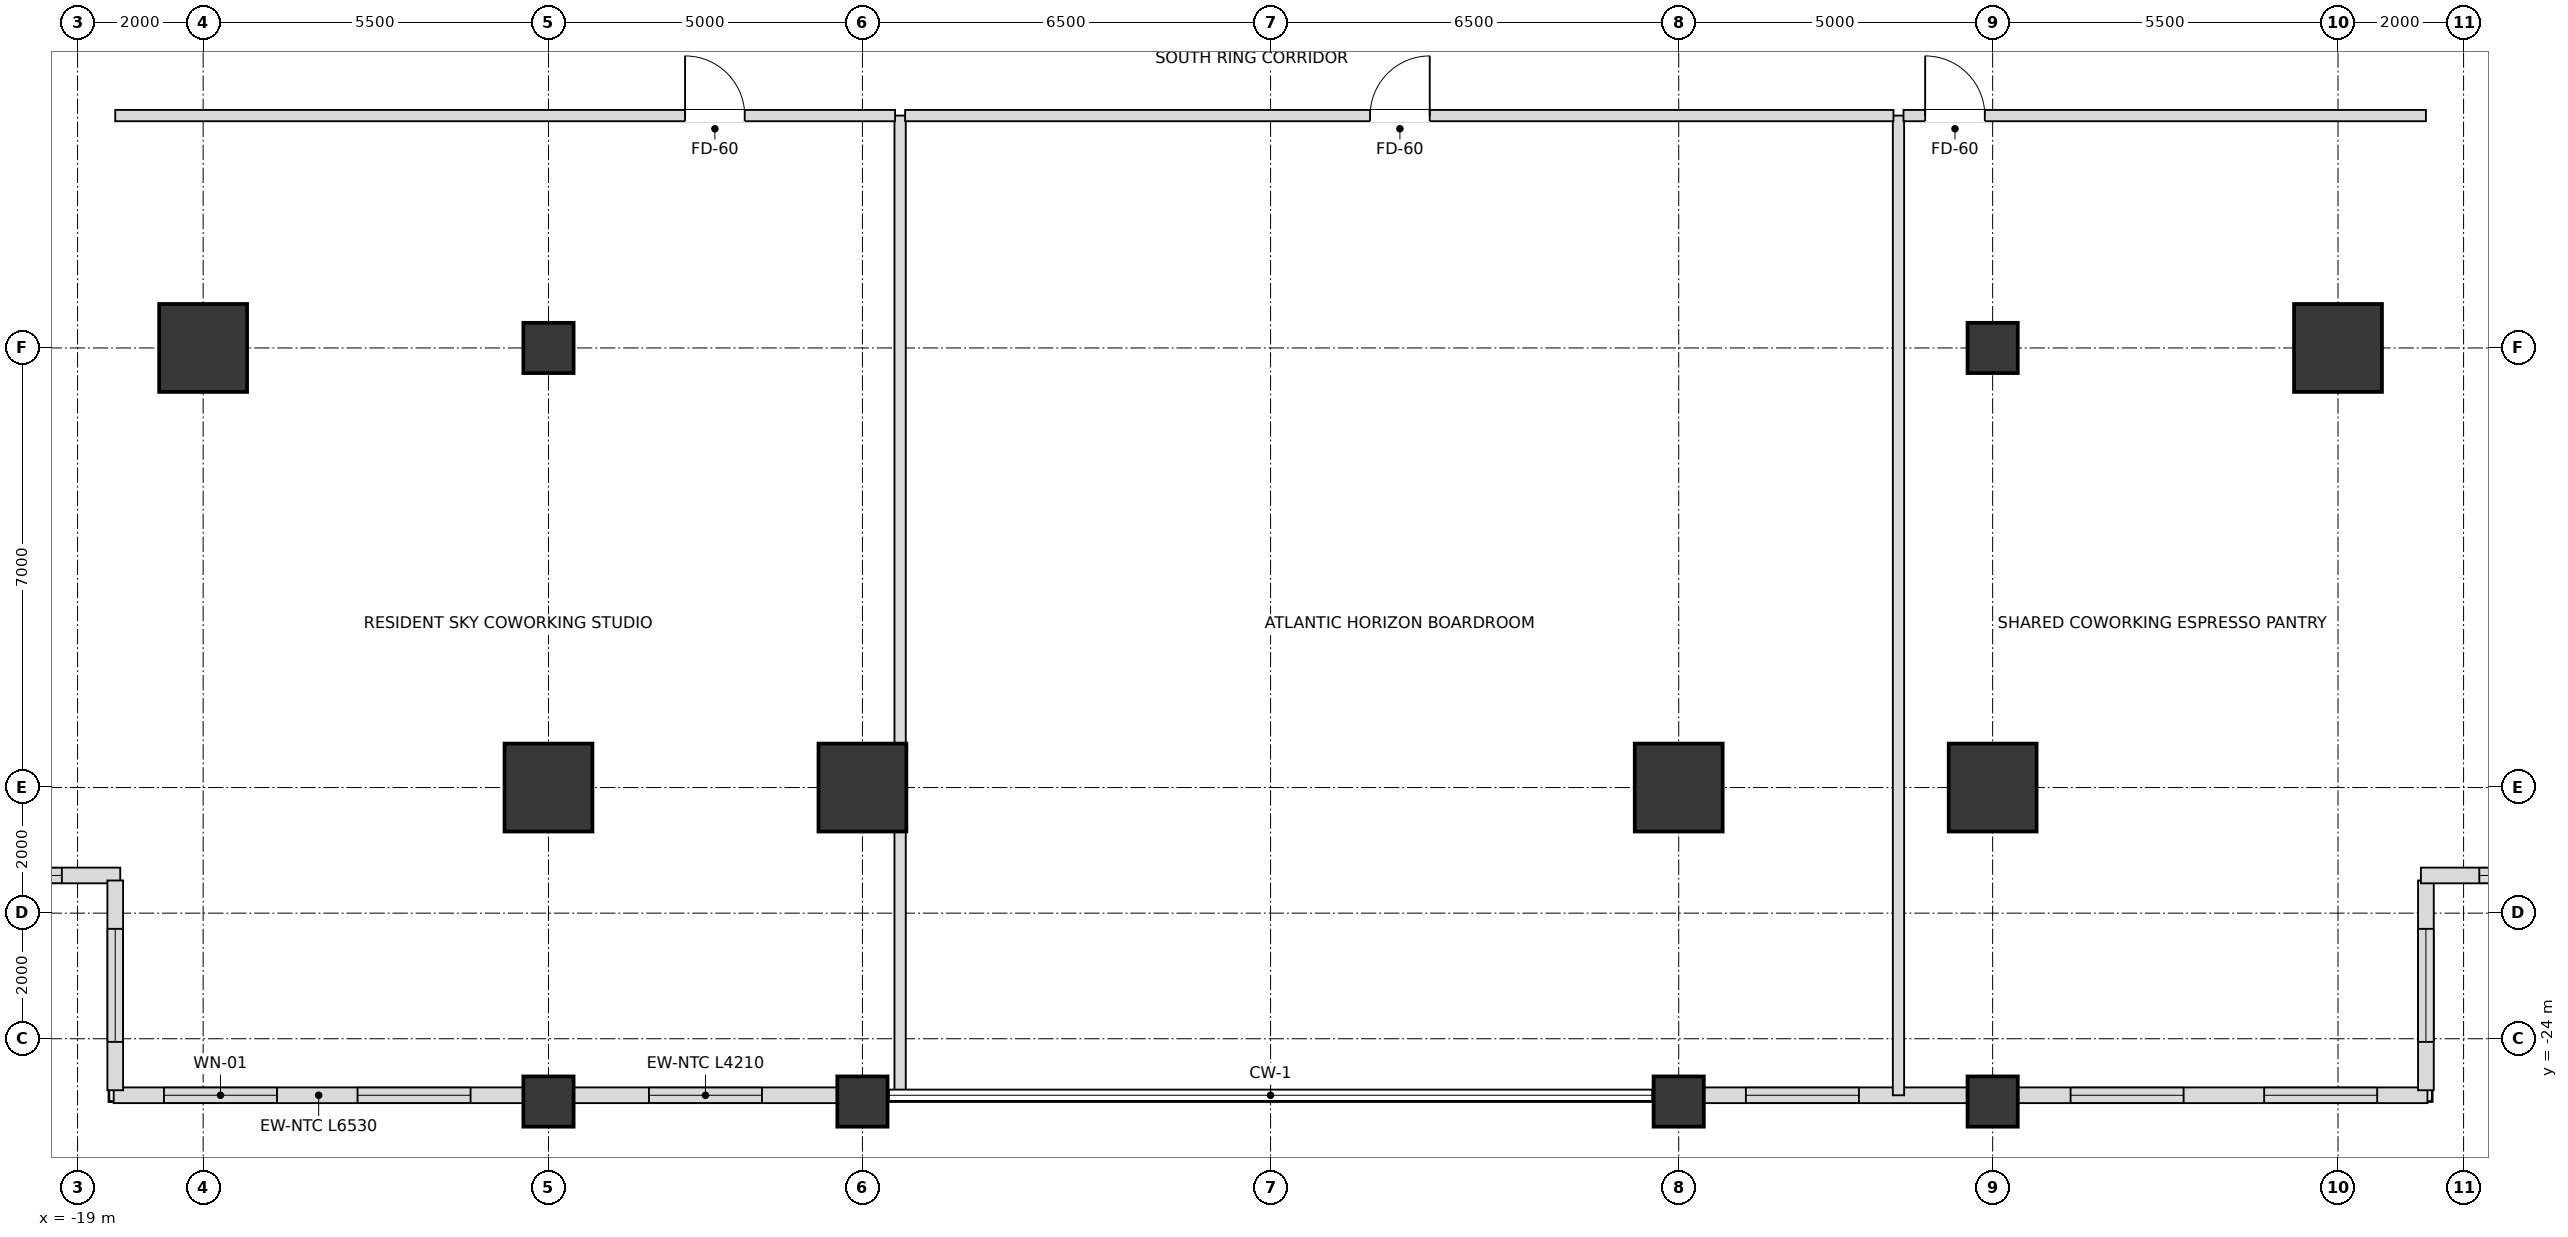
"""IFC4 building model, lengths in metres.
Left out: names, types, materials, properties, quantities, classifications, styles, units other than length and angle.
Written with IfcOpenShell. Run it as: python <this file> out.ifc"""

import sys

from ifc_helpers import new_model, si_unit, direction, frame, frame_2d, origin, origin_2d, place, context, subcontext, project, spatial, rectangle, extrude, element, fill, save


model = new_model("IFC4")
c1 = context("Model", 3, precision=1e-05, world=origin(), true_north=direction((0.0, 1.0)))
c2 = subcontext(c1, "Body", "Model", "MODEL_VIEW")
j1 = project(units=[si_unit("LENGTHUNIT", "METRE"), si_unit("PLANEANGLEUNIT", "RADIAN")], contexts=[c1])
p1 = place(None, origin())
s1 = spatial("IfcSite", under=j1, at=p1, CompositionType="ELEMENT")
p2 = place(p1, origin())
s2 = spatial("IfcBuilding", under=s1, at=p2, CompositionType="ELEMENT")
p3 = place(p2, frame((0.0, 0.0, 64.8)))
s3 = spatial("IfcBuildingStorey", under=s2, at=p3, CompositionType="ELEMENT", Elevation=64.8)
for number, where, z_axis, x_axis in (
    (1, (-11.5, -20.0, 0.0), (0.0, 0.0, 1.0), (1.0, 0.0, 0.0)),
    (2, (-6.5, -20.0, 0.0), (0.0, 0.0, 1.0), (1.0, 0.0, 0.0)),
    (3, (6.5, -20.0, 0.0), (0.0, 0.0, 1.0), (1.0, 0.0, 0.0)),
    (4, (11.5, -20.0, 0.0), (0.0, 0.0, 1.0), (1.0, 0.0, 0.0)),
    (5, (17.0, -13.0, 0.0), (0.0, 0.0, 1.0), (1.0, 0.0, 0.0)),
    (6, (-17.0, -13.0, 0.0), (0.0, 0.0, 1.0), (1.0, 0.0, 0.0)),
):
    element("IfcColumn", number, at=place(p3, frame(where, z_axis=z_axis, x_axis=x_axis)), inside=s3, PredefinedType="USERDEFINED", context=c2, shape_type="SweptSolid", body=[
        extrude(rectangle(XDim=1.4, YDim=1.4, at=origin_2d()), origin(), (0.0, 0.0, 1.0), 3.6),
    ])
for number, where, z_axis, x_axis in (
    (7, (-11.5, -13.0, 0.0), (0.0, 0.0, 1.0), (1.0, 0.0, 0.0)),
    (8, (11.5, -13.0, 0.0), (0.0, 0.0, 1.0), (1.0, 0.0, 0.0)),
    (9, (-11.5, -25.0, 0.0), (0.0, 0.0, 1.0), (1.0, 0.0, 0.0)),
    (10, (-6.5, -25.0, 0.0), (0.0, 0.0, 1.0), (1.0, 0.0, 0.0)),
    (11, (6.5, -25.0, 0.0), (0.0, 0.0, 1.0), (1.0, 0.0, 0.0)),
    (12, (11.5, -25.0, 0.0), (0.0, 0.0, 1.0), (1.0, 0.0, 0.0)),
):
    element("IfcColumn", number, at=place(p3, frame(where, z_axis=z_axis, x_axis=x_axis)), inside=s3, PredefinedType="COLUMN", context=c2, shape_type="SweptSolid", body=[
        extrude(rectangle(XDim=0.8, YDim=0.8, at=origin_2d()), origin(), (0.0, 0.0, 1.0), 3.6),
    ])
p4 = place(p3, frame((-18.425, -24.9, 0.0), z_axis=(0.0, 0.0, 1.0), x_axis=(1.0, 0.0, 0.0)))
e13 = element("IfcWall", 13, at=p4, inside=s3, PredefinedType="SOLIDWALL", context=c2, shape_type="SweptSolid", body=[
    extrude(rectangle(XDim=6.53, YDim=0.25, at=frame_2d((3.265, 0.0))), origin(), (0.0, 0.0, 1.0), 2.736),
])
p5 = place(p4, frame((0.801, 0.0, 0.72)))
e14 = element("IfcOpeningElement", 14, at=p5, cuts=e13, PredefinedType="OPENING", context=c2, shape_type="SweptSolid", body=[
    extrude(rectangle(XDim=1.8, YDim=1.68, at=frame_2d((0.9, 0.84))), frame((0.0, 0.135, 0.0), z_axis=(0.0, -1.0, 0.0), x_axis=(1.0, 0.0, 0.0)), (0.0, 0.0, 1.0), 0.27),
])
p6 = place(p4, frame((3.884, 0.0, 0.72)))
e15 = element("IfcOpeningElement", 15, at=p6, cuts=e13, PredefinedType="OPENING", context=c2, shape_type="SweptSolid", body=[
    extrude(rectangle(XDim=1.8, YDim=1.68, at=frame_2d((0.9, 0.84))), frame((0.0, 0.135, 0.0), z_axis=(0.0, -1.0, 0.0), x_axis=(1.0, 0.0, 0.0)), (0.0, 0.0, 1.0), 0.27),
])
p7 = place(p3, frame((-11.105, -24.9, 0.0), z_axis=(0.0, 0.0, 1.0), x_axis=(1.0, 0.0, 0.0)))
e16 = element("IfcWall", 16, at=p7, inside=s3, PredefinedType="SOLIDWALL", context=c2, shape_type="SweptSolid", body=[
    extrude(rectangle(XDim=4.21, YDim=0.25, at=frame_2d((2.105, 0.0))), origin(), (0.0, 0.0, 1.0), 2.736),
])
p8 = place(p7, frame((1.205, 0.0, 0.72)))
e17 = element("IfcOpeningElement", 17, at=p8, cuts=e16, PredefinedType="OPENING", context=c2, shape_type="SweptSolid", body=[
    extrude(rectangle(XDim=1.8, YDim=1.68, at=frame_2d((0.9, 0.84))), frame((0.0, 0.135, 0.0), z_axis=(0.0, -1.0, 0.0), x_axis=(1.0, 0.0, 0.0)), (0.0, 0.0, 1.0), 0.27),
])
p9 = place(p3, frame((6.895, -24.9, 0.0), z_axis=(0.0, 0.0, 1.0), x_axis=(1.0, 0.0, 0.0)))
e18 = element("IfcWall", 18, at=p9, inside=s3, PredefinedType="SOLIDWALL", context=c2, shape_type="SweptSolid", body=[
    extrude(rectangle(XDim=4.21, YDim=0.25, at=frame_2d((2.105, 0.0))), origin(), (0.0, 0.0, 1.0), 2.736),
])
p10 = place(p9, frame((0.675, 0.0, 0.72)))
e19 = element("IfcOpeningElement", 19, at=p10, cuts=e18, PredefinedType="OPENING", context=c2, shape_type="SweptSolid", body=[
    extrude(rectangle(XDim=1.8, YDim=1.68, at=frame_2d((0.9, 0.84))), frame((0.0, 0.135, 0.0), z_axis=(0.0, -1.0, 0.0), x_axis=(1.0, 0.0, 0.0)), (0.0, 0.0, 1.0), 0.27),
])
p11 = place(p3, frame((11.895, -24.9, 0.0), z_axis=(0.0, 0.0, 1.0), x_axis=(1.0, 0.0, 0.0)))
e20 = element("IfcWall", 20, at=p11, inside=s3, PredefinedType="SOLIDWALL", context=c2, shape_type="SweptSolid", body=[
    extrude(rectangle(XDim=6.53, YDim=0.25, at=frame_2d((3.265, 0.0))), origin(), (0.0, 0.0, 1.0), 2.736),
])
p12 = place(p11, frame((0.846, 0.0, 0.72)))
e21 = element("IfcOpeningElement", 21, at=p12, cuts=e20, PredefinedType="OPENING", context=c2, shape_type="SweptSolid", body=[
    extrude(rectangle(XDim=1.8, YDim=1.68, at=frame_2d((0.9, 0.84))), frame((0.0, 0.135, 0.0), z_axis=(0.0, -1.0, 0.0), x_axis=(1.0, 0.0, 0.0)), (0.0, 0.0, 1.0), 0.27),
])
p13 = place(p11, frame((3.929, 0.0, 0.72)))
e22 = element("IfcOpeningElement", 22, at=p13, cuts=e20, PredefinedType="OPENING", context=c2, shape_type="SweptSolid", body=[
    extrude(rectangle(XDim=1.8, YDim=1.68, at=frame_2d((0.9, 0.84))), frame((0.0, 0.135, 0.0), z_axis=(0.0, -1.0, 0.0), x_axis=(1.0, 0.0, 0.0)), (0.0, 0.0, 1.0), 0.27),
])
p14 = place(p3, frame((-21.98, -21.4, 0.0), z_axis=(0.0, 0.0, 1.0), x_axis=(1.0, 0.0, 0.0)))
e23 = element("IfcWall", 23, at=p14, inside=s3, PredefinedType="SOLIDWALL", context=c2, shape_type="SweptSolid", body=[
    extrude(rectangle(XDim=3.66, YDim=0.25, at=frame_2d((1.83, 0.0))), origin(), (0.0, 0.0, 1.0), 2.736),
])
p15 = place(p14, frame((0.93, 0.0, 0.72)))
e24 = element("IfcOpeningElement", 24, at=p15, cuts=e23, PredefinedType="OPENING", context=c2, shape_type="SweptSolid", body=[
    extrude(rectangle(XDim=1.8, YDim=1.68, at=frame_2d((0.9, 0.84))), frame((0.0, 0.135, 0.0), z_axis=(0.0, -1.0, 0.0), x_axis=(1.0, 0.0, 0.0)), (0.0, 0.0, 1.0), 0.27),
])
p16 = place(p3, frame((-18.4, -21.48, 0.0), z_axis=(0.0, 0.0, 1.0), x_axis=(0.0, -1.0, 0.0)))
e25 = element("IfcWall", 25, at=p16, inside=s3, PredefinedType="SOLIDWALL", context=c2, shape_type="SweptSolid", body=[
    extrude(rectangle(XDim=3.34, YDim=0.25, at=frame_2d((1.67, 0.0))), origin(), (0.0, 0.0, 1.0), 2.736),
])
p17 = place(p16, frame((0.77, 0.0, 0.72)))
e26 = element("IfcOpeningElement", 26, at=p17, cuts=e25, PredefinedType="OPENING", context=c2, shape_type="SweptSolid", body=[
    extrude(rectangle(XDim=1.8, YDim=1.68, at=frame_2d((0.9, 0.84))), frame((0.0, 0.135, 0.0), z_axis=(0.0, -1.0, 0.0), x_axis=(1.0, 0.0, 0.0)), (0.0, 0.0, 1.0), 0.27),
])
p18 = place(p3, frame((18.4, -24.82, 0.0), z_axis=(0.0, 0.0, 1.0), x_axis=(0.0, 1.0, 0.0)))
e27 = element("IfcWall", 27, at=p18, inside=s3, PredefinedType="SOLIDWALL", context=c2, shape_type="SweptSolid", body=[
    extrude(rectangle(XDim=3.34, YDim=0.25, at=frame_2d((1.67, 0.0))), origin(), (0.0, 0.0, 1.0), 2.736),
])
p19 = place(p18, frame((0.77, 0.0, 0.72)))
e28 = element("IfcOpeningElement", 28, at=p19, cuts=e27, PredefinedType="OPENING", context=c2, shape_type="SweptSolid", body=[
    extrude(rectangle(XDim=1.8, YDim=1.68, at=frame_2d((0.9, 0.84))), frame((0.0, 0.135, 0.0), z_axis=(0.0, -1.0, 0.0), x_axis=(1.0, 0.0, 0.0)), (0.0, 0.0, 1.0), 0.27),
])
p20 = place(p3, frame((18.32, -21.4, 0.0), z_axis=(0.0, 0.0, 1.0), x_axis=(1.0, 0.0, 0.0)))
e29 = element("IfcWall", 29, at=p20, inside=s3, PredefinedType="SOLIDWALL", context=c2, shape_type="SweptSolid", body=[
    extrude(rectangle(XDim=3.66, YDim=0.25, at=frame_2d((1.83, 0.0))), origin(), (0.0, 0.0, 1.0), 2.736),
])
p21 = place(p20, frame((0.93, 0.0, 0.72)))
e30 = element("IfcOpeningElement", 30, at=p21, cuts=e29, PredefinedType="OPENING", context=c2, shape_type="SweptSolid", body=[
    extrude(rectangle(XDim=1.8, YDim=1.68, at=frame_2d((0.9, 0.84))), frame((0.0, 0.135, 0.0), z_axis=(0.0, -1.0, 0.0), x_axis=(1.0, 0.0, 0.0)), (0.0, 0.0, 1.0), 0.27),
])
for number, where, z_axis, x_axis in (
    (31, (-5.9, -24.9, 0.0), (0.0, 0.0, 1.0), (0.0, 1.0, 0.0)),
    (32, (10.0, -24.9, 0.0), (0.0, 0.0, 1.0), (0.0, 1.0, 0.0)),
):
    element("IfcWall", number, at=place(p3, frame(where, z_axis=z_axis, x_axis=x_axis)), inside=s3, PredefinedType="PARTITIONING", context=c2, shape_type="SweptSolid", body=[
        extrude(rectangle(XDim=15.6, YDim=0.18, at=frame_2d((7.8, 0.0))), origin(), (0.0, 0.0, 1.0), 2.816),
    ])
p22 = place(p3, frame((-18.4, -9.3, 0.0), z_axis=(0.0, 0.0, 1.0), x_axis=(1.0, 0.0, 0.0)))
e33 = element("IfcWall", 33, at=p22, inside=s3, PredefinedType="PARTITIONING", context=c2, shape_type="SweptSolid", body=[
    extrude(rectangle(XDim=12.42, YDim=0.18, at=frame_2d((6.21, 0.0))), origin(), (0.0, 0.0, 1.0), 2.816),
])
p23 = place(p22, frame((9.075, 0.0, 0.0)))
e34 = element("IfcOpeningElement", 34, at=p23, cuts=e33, PredefinedType="OPENING", context=c2, shape_type="SweptSolid", body=[
    extrude(rectangle(XDim=0.95, YDim=2.15, at=frame_2d((0.475, 1.075))), frame((0.0, 0.1, 0.0), z_axis=(0.0, -1.0, 0.0), x_axis=(1.0, 0.0, 0.0)), (0.0, 0.0, 1.0), 0.2),
])
p24 = place(p3, frame((-5.82, -9.3, 0.0), z_axis=(0.0, 0.0, 1.0), x_axis=(1.0, 0.0, 0.0)))
e35 = element("IfcWall", 35, at=p24, inside=s3, PredefinedType="PARTITIONING", context=c2, shape_type="SweptSolid", body=[
    extrude(rectangle(XDim=15.74, YDim=0.18, at=frame_2d((7.87, 0.0))), origin(), (0.0, 0.0, 1.0), 2.816),
])
p25 = place(p24, frame((7.405, 0.0, 0.0)))
e36 = element("IfcOpeningElement", 36, at=p25, cuts=e35, PredefinedType="OPENING", context=c2, shape_type="SweptSolid", body=[
    extrude(rectangle(XDim=0.95, YDim=2.15, at=frame_2d((0.475, 1.075))), frame((0.0, 0.1, 0.0), z_axis=(0.0, -1.0, 0.0), x_axis=(1.0, 0.0, 0.0)), (0.0, 0.0, 1.0), 0.2),
])
p26 = place(p3, frame((10.08, -9.3, 0.0), z_axis=(0.0, 0.0, 1.0), x_axis=(1.0, 0.0, 0.0)))
e37 = element("IfcWall", 37, at=p26, inside=s3, PredefinedType="PARTITIONING", context=c2, shape_type="SweptSolid", body=[
    extrude(rectangle(XDim=8.32, YDim=0.18, at=frame_2d((4.16, 0.0))), origin(), (0.0, 0.0, 1.0), 2.816),
])
p27 = place(p26, frame((0.345, 0.0, 0.0)))
e38 = element("IfcOpeningElement", 38, at=p27, cuts=e37, PredefinedType="OPENING", context=c2, shape_type="SweptSolid", body=[
    extrude(rectangle(XDim=0.95, YDim=2.15, at=frame_2d((0.475, 1.075))), frame((0.0, 0.1, 0.0), z_axis=(0.0, -1.0, 0.0), x_axis=(1.0, 0.0, 0.0)), (0.0, 0.0, 1.0), 0.2),
])
p28 = place(p5, origin())
e39 = element("IfcWindow", 39, at=p28, inside=s3, PartitioningType="SINGLE_PANEL", PredefinedType="WINDOW", context=c2, shape_type="SweptSolid", body=[
    extrude(rectangle(XDim=1.8, YDim=1.68, at=frame_2d((0.9, 0.84))), frame((0.0, 0.03, 0.0), z_axis=(0.0, -1.0, 0.0), x_axis=(1.0, 0.0, 0.0)), (0.0, 0.0, 1.0), 0.06),
])
fill(e14, e39)
p29 = place(p6, origin())
e40 = element("IfcWindow", 40, at=p29, inside=s3, PartitioningType="SINGLE_PANEL", PredefinedType="WINDOW", context=c2, shape_type="SweptSolid", body=[
    extrude(rectangle(XDim=1.8, YDim=1.68, at=frame_2d((0.9, 0.84))), frame((0.0, 0.03, 0.0), z_axis=(0.0, -1.0, 0.0), x_axis=(1.0, 0.0, 0.0)), (0.0, 0.0, 1.0), 0.06),
])
fill(e15, e40)
p30 = place(p8, origin())
e41 = element("IfcWindow", 41, at=p30, inside=s3, PartitioningType="SINGLE_PANEL", PredefinedType="WINDOW", context=c2, shape_type="SweptSolid", body=[
    extrude(rectangle(XDim=1.8, YDim=1.68, at=frame_2d((0.9, 0.84))), frame((0.0, 0.03, 0.0), z_axis=(0.0, -1.0, 0.0), x_axis=(1.0, 0.0, 0.0)), (0.0, 0.0, 1.0), 0.06),
])
fill(e17, e41)
p31 = place(p10, origin())
e42 = element("IfcWindow", 42, at=p31, inside=s3, PartitioningType="SINGLE_PANEL", PredefinedType="WINDOW", context=c2, shape_type="SweptSolid", body=[
    extrude(rectangle(XDim=1.8, YDim=1.68, at=frame_2d((0.9, 0.84))), frame((0.0, 0.03, 0.0), z_axis=(0.0, -1.0, 0.0), x_axis=(1.0, 0.0, 0.0)), (0.0, 0.0, 1.0), 0.06),
])
fill(e19, e42)
p32 = place(p12, origin())
e43 = element("IfcWindow", 43, at=p32, inside=s3, PartitioningType="SINGLE_PANEL", PredefinedType="WINDOW", context=c2, shape_type="SweptSolid", body=[
    extrude(rectangle(XDim=1.8, YDim=1.68, at=frame_2d((0.9, 0.84))), frame((0.0, 0.03, 0.0), z_axis=(0.0, -1.0, 0.0), x_axis=(1.0, 0.0, 0.0)), (0.0, 0.0, 1.0), 0.06),
])
fill(e21, e43)
p33 = place(p13, origin())
e44 = element("IfcWindow", 44, at=p33, inside=s3, PartitioningType="SINGLE_PANEL", PredefinedType="WINDOW", context=c2, shape_type="SweptSolid", body=[
    extrude(rectangle(XDim=1.8, YDim=1.68, at=frame_2d((0.9, 0.84))), frame((0.0, 0.03, 0.0), z_axis=(0.0, -1.0, 0.0), x_axis=(1.0, 0.0, 0.0)), (0.0, 0.0, 1.0), 0.06),
])
fill(e22, e44)
p34 = place(p15, origin())
e45 = element("IfcWindow", 45, at=p34, inside=s3, PartitioningType="SINGLE_PANEL", PredefinedType="WINDOW", context=c2, shape_type="SweptSolid", body=[
    extrude(rectangle(XDim=1.8, YDim=1.68, at=frame_2d((0.9, 0.84))), frame((0.0, 0.03, 0.0), z_axis=(0.0, -1.0, 0.0), x_axis=(1.0, 0.0, 0.0)), (0.0, 0.0, 1.0), 0.06),
])
fill(e24, e45)
p35 = place(p17, origin())
e46 = element("IfcWindow", 46, at=p35, inside=s3, PartitioningType="SINGLE_PANEL", PredefinedType="WINDOW", context=c2, shape_type="SweptSolid", body=[
    extrude(rectangle(XDim=1.8, YDim=1.68, at=frame_2d((0.9, 0.84))), frame((0.0, 0.03, 0.0), z_axis=(0.0, -1.0, 0.0), x_axis=(1.0, 0.0, 0.0)), (0.0, 0.0, 1.0), 0.06),
])
fill(e26, e46)
p36 = place(p19, origin())
e47 = element("IfcWindow", 47, at=p36, inside=s3, PartitioningType="SINGLE_PANEL", PredefinedType="WINDOW", context=c2, shape_type="SweptSolid", body=[
    extrude(rectangle(XDim=1.8, YDim=1.68, at=frame_2d((0.9, 0.84))), frame((0.0, 0.03, 0.0), z_axis=(0.0, -1.0, 0.0), x_axis=(1.0, 0.0, 0.0)), (0.0, 0.0, 1.0), 0.06),
])
fill(e28, e47)
p37 = place(p21, origin())
e48 = element("IfcWindow", 48, at=p37, inside=s3, PartitioningType="SINGLE_PANEL", PredefinedType="WINDOW", context=c2, shape_type="SweptSolid", body=[
    extrude(rectangle(XDim=1.8, YDim=1.68, at=frame_2d((0.9, 0.84))), frame((0.0, 0.03, 0.0), z_axis=(0.0, -1.0, 0.0), x_axis=(1.0, 0.0, 0.0)), (0.0, 0.0, 1.0), 0.06),
])
fill(e30, e48)
p38 = place(p23, origin())
e49 = element("IfcDoor", 49, at=p38, inside=s3, OperationType="SINGLE_SWING_LEFT", PredefinedType="DOOR", context=c2, shape_type="SweptSolid", body=[
    extrude(rectangle(XDim=0.95, YDim=2.15, at=frame_2d((0.475, 1.075))), frame((0.0, 0.025, 0.0), z_axis=(0.0, -1.0, 0.0), x_axis=(1.0, 0.0, 0.0)), (0.0, 0.0, 1.0), 0.05),
])
fill(e34, e49)
p39 = place(p25, origin())
e50 = element("IfcDoor", 50, at=p39, inside=s3, OperationType="SINGLE_SWING_RIGHT", PredefinedType="DOOR", context=c2, shape_type="SweptSolid", body=[
    extrude(rectangle(XDim=0.95, YDim=2.15, at=frame_2d((0.475, 1.075))), frame((0.0, 0.025, 0.0), z_axis=(0.0, -1.0, 0.0), x_axis=(1.0, 0.0, 0.0)), (0.0, 0.0, 1.0), 0.05),
])
fill(e36, e50)
p40 = place(p27, origin())
e51 = element("IfcDoor", 51, at=p40, inside=s3, OperationType="SINGLE_SWING_LEFT", PredefinedType="DOOR", context=c2, shape_type="SweptSolid", body=[
    extrude(rectangle(XDim=0.95, YDim=2.15, at=frame_2d((0.475, 1.075))), frame((0.0, 0.025, 0.0), z_axis=(0.0, -1.0, 0.0), x_axis=(1.0, 0.0, 0.0)), (0.0, 0.0, 1.0), 0.05),
])
fill(e38, e51)
save(model, sys.argv[1])
